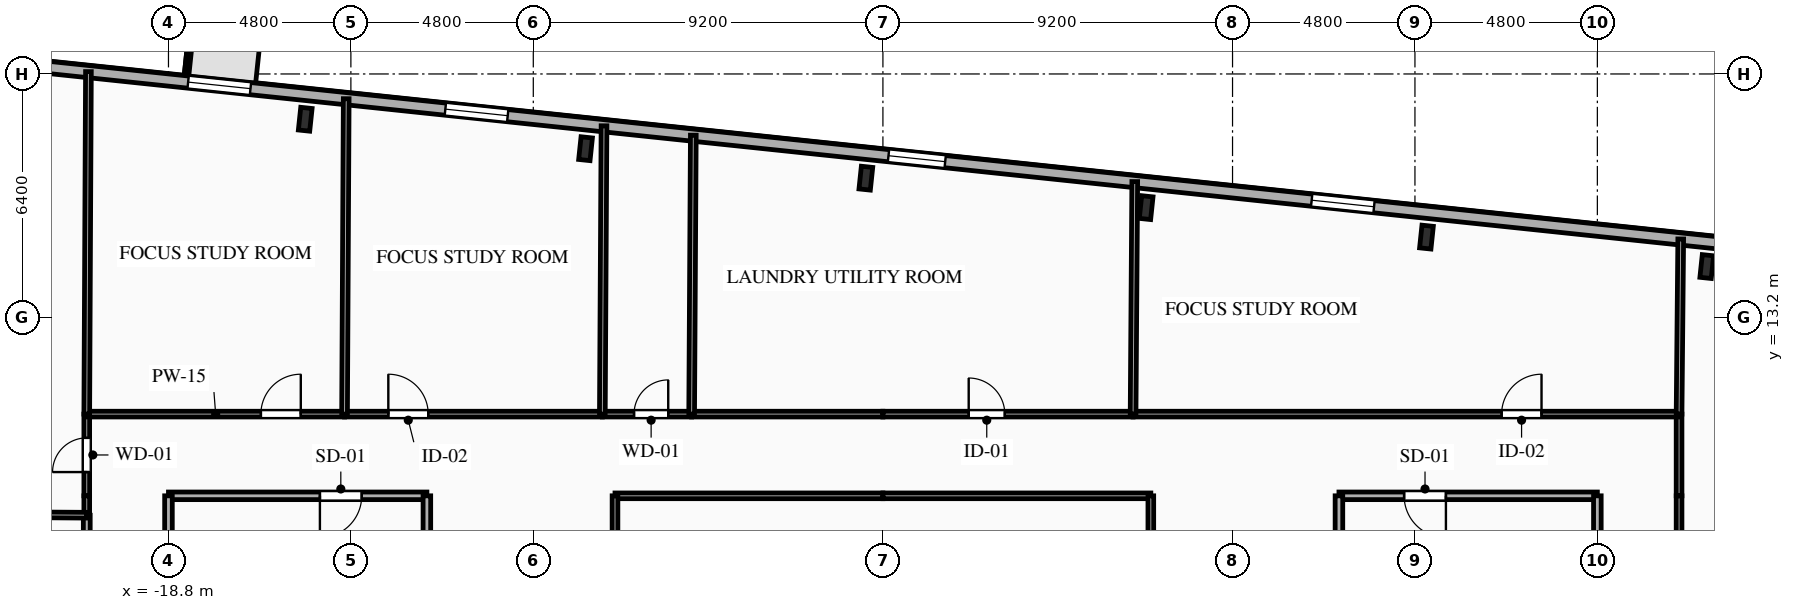
"""IFC4 building model, lengths in metres.
Left out: names, types, materials, properties, quantities, classifications, styles, units other than length and angle.
Written with IfcOpenShell. Run it as: python <this file> out.ifc"""

import sys

from ifc_helpers import new_model, si_unit, direction, frame, frame_2d, origin, origin_2d, place, context, subcontext, project, spatial, rectangle, i_section, extrude, element, fill, save


model = new_model("IFC4")
c1 = context("Model", 3, precision=1e-05, world=origin(), true_north=direction((0.0, 1.0)))
c2 = subcontext(c1, "Body", "Model", "MODEL_VIEW")
j1 = project(units=[si_unit("LENGTHUNIT", "METRE"), si_unit("PLANEANGLEUNIT", "RADIAN")], contexts=[c1])
p1 = place(None, origin())
s1 = spatial("IfcSite", under=j1, at=p1, CompositionType="ELEMENT")
p2 = place(p1, origin())
s2 = spatial("IfcBuilding", under=s1, at=p2, CompositionType="ELEMENT")
p3 = place(p2, frame((0.0, 0.0, 219.85)))
s3 = spatial("IfcBuildingStorey", under=s2, at=p3, CompositionType="ELEMENT", Elevation=219.85)
for number, where, z_axis, x_axis in (
    (1, (21.679, 14.532, 0.0), (0.0, 0.0, 1.0), (0.995, -0.105, 0.0)),
    (2, (14.303, 15.308, 0.0), (0.0, 0.0, 1.0), (0.995, -0.105, 0.0)),
    (3, (6.927, 16.083, 0.0), (0.0, 0.0, 1.0), (0.995, -0.105, 0.0)),
    (4, (-0.449, 16.858, 0.0), (0.0, 0.0, 1.0), (0.995, -0.105, 0.0)),
    (5, (-7.825, 17.634, 0.0), (0.0, 0.0, 1.0), (0.995, -0.105, 0.0)),
    (6, (-15.201, 18.409, 0.0), (0.0, 0.0, 1.0), (0.995, -0.105, 0.0)),
):
    element("IfcColumn", number, at=place(p3, frame(where, z_axis=z_axis, x_axis=x_axis)), inside=s3, PredefinedType="COLUMN", context=c2, shape_type="SweptSolid", body=[
        extrude(i_section(OverallWidth=0.3, OverallDepth=0.6, WebThickness=0.015, FlangeThickness=0.03, FilletRadius=0.027, at=origin_2d()), origin(), (0.0, 0.0, 1.0), 3.35),
    ])
p4 = place(p3, frame((-23.156, 19.898, 0.0), z_axis=(0.0, 0.0, 1.0), x_axis=(0.994522001802, -0.104527450613, 0.0)))
e7 = element("IfcWall", 7, at=p4, inside=s3, PredefinedType="SOLIDWALL", context=c2, shape_type="SweptSolid", body=[
    extrude(rectangle(XDim=45.8, YDim=0.32, at=frame_2d((22.9, 0.0))), origin(), (0.0, 0.0, 1.0), 3.0),
])
p5 = place(p4, frame((4.9, 0.0, 0.85)))
e8 = element("IfcOpeningElement", 8, at=p5, cuts=e7, PredefinedType="OPENING", context=c2, shape_type="SweptSolid", body=[
    extrude(rectangle(XDim=1.65, YDim=1.85, at=frame_2d((0.825, 0.925))), frame((0.0, 0.17, 0.0), z_axis=(0.0, -1.0, 0.0), x_axis=(1.0, 0.0, 0.0)), (0.0, 0.0, 1.0), 0.34),
])
p6 = place(p4, frame((11.706, 0.0, 0.85)))
e9 = element("IfcOpeningElement", 9, at=p6, cuts=e7, PredefinedType="OPENING", context=c2, shape_type="SweptSolid", body=[
    extrude(rectangle(XDim=1.65, YDim=1.85, at=frame_2d((0.825, 0.925))), frame((0.0, 0.17, 0.0), z_axis=(0.0, -1.0, 0.0), x_axis=(1.0, 0.0, 0.0)), (0.0, 0.0, 1.0), 0.34),
])
p7 = place(p4, frame((23.431, 0.0, 0.85)))
e10 = element("IfcOpeningElement", 10, at=p7, cuts=e7, PredefinedType="OPENING", context=c2, shape_type="SweptSolid", body=[
    extrude(rectangle(XDim=1.5, YDim=1.85, at=frame_2d((0.75, 0.925))), frame((0.0, 0.17, 0.0), z_axis=(0.0, -1.0, 0.0), x_axis=(1.0, 0.0, 0.0)), (0.0, 0.0, 1.0), 0.34),
])
p8 = place(p4, frame((34.628, 0.0, 0.85)))
e11 = element("IfcOpeningElement", 11, at=p8, cuts=e7, PredefinedType="OPENING", context=c2, shape_type="SweptSolid", body=[
    extrude(rectangle(XDim=1.65, YDim=1.85, at=frame_2d((0.825, 0.925))), frame((0.0, 0.17, 0.0), z_axis=(0.0, -1.0, 0.0), x_axis=(1.0, 0.0, 0.0)), (0.0, 0.0, 1.0), 0.34),
])
p9 = place(p3, frame((-12.0, 8.5, 0.0), z_axis=(0.0, 0.0, 1.0), x_axis=(-1.0, 0.0, 0.0)))
e12 = element("IfcWall", 12, at=p9, inside=s3, PredefinedType="PARTITIONING", context=c2, shape_type="SweptSolid", body=[
    extrude(rectangle(XDim=6.8, YDim=0.2, at=frame_2d((3.4, 0.0))), origin(), (0.0, 0.0, 1.0), 3.0),
])
p10 = place(p9, frame((1.715, 0.0, 0.0)))
e13 = element("IfcOpeningElement", 13, at=p10, cuts=e12, PredefinedType="OPENING", context=c2, shape_type="SweptSolid", body=[
    extrude(rectangle(XDim=1.1, YDim=2.15, at=frame_2d((0.55, 1.075))), frame((0.0, 0.11, 0.0), z_axis=(0.0, -1.0, 0.0), x_axis=(1.0, 0.0, 0.0)), (0.0, 0.0, 1.0), 0.22),
])
p11 = place(p3, frame((-18.8, 8.5, 0.0), z_axis=(0.0, 0.0, 1.0), x_axis=(0.0, -1.0, 0.0)))
e14 = element("IfcWall", 14, at=p11, inside=s3, PredefinedType="PARTITIONING", context=c2, shape_type="SweptSolid", body=[
    extrude(rectangle(XDim=2.9, YDim=0.2, at=frame_2d((1.45, 0.0))), origin(), (0.0, 0.0, 1.0), 2.625),
])
p12 = place(p3, frame((-12.0, 5.6, 0.0), z_axis=(0.0, 0.0, 1.0), x_axis=(0.0, 1.0, 0.0)))
e15 = element("IfcWall", 15, at=p12, inside=s3, PredefinedType="PARTITIONING", context=c2, shape_type="SweptSolid", body=[
    extrude(rectangle(XDim=2.9, YDim=0.2, at=frame_2d((1.45, 0.0))), origin(), (0.0, 0.0, 1.0), 3.0),
])
p13 = place(p3, frame((18.8, 8.5, 0.0), z_axis=(0.0, 0.0, 1.0), x_axis=(-1.0, 0.0, 0.0)))
e16 = element("IfcWall", 16, at=p13, inside=s3, PredefinedType="PARTITIONING", context=c2, shape_type="SweptSolid", body=[
    extrude(rectangle(XDim=6.8, YDim=0.2, at=frame_2d((3.4, 0.0))), origin(), (0.0, 0.0, 1.0), 3.0),
])
p14 = place(p13, frame((3.985, 0.0, 0.0)))
e17 = element("IfcOpeningElement", 17, at=p14, cuts=e16, PredefinedType="OPENING", context=c2, shape_type="SweptSolid", body=[
    extrude(rectangle(XDim=1.1, YDim=2.15, at=frame_2d((0.55, 1.075))), frame((0.0, 0.11, 0.0), z_axis=(0.0, -1.0, 0.0), x_axis=(1.0, 0.0, 0.0)), (0.0, 0.0, 1.0), 0.22),
])
p15 = place(p3, frame((18.8, 5.6, 0.0), z_axis=(0.0, 0.0, 1.0), x_axis=(0.0, 1.0, 0.0)))
e18 = element("IfcWall", 18, at=p15, inside=s3, PredefinedType="PARTITIONING", context=c2, shape_type="SweptSolid", body=[
    extrude(rectangle(XDim=2.9, YDim=0.2, at=frame_2d((1.45, 0.0))), origin(), (0.0, 0.0, 1.0), 2.625),
])
p16 = place(p3, frame((12.0, 8.5, 0.0), z_axis=(0.0, 0.0, 1.0), x_axis=(0.0, -1.0, 0.0)))
e19 = element("IfcWall", 19, at=p16, inside=s3, PredefinedType="PARTITIONING", context=c2, shape_type="SweptSolid", body=[
    extrude(rectangle(XDim=2.9, YDim=0.2, at=frame_2d((1.45, 0.0))), origin(), (0.0, 0.0, 1.0), 3.0),
])
p17 = place(p3, frame((-20.95, 8.5, 0.0), z_axis=(0.0, 0.0, 1.0), x_axis=(0.0, 1.0, 0.0)))
e20 = element("IfcWall", 20, at=p17, inside=s3, PredefinedType="PARTITIONING", context=c2, shape_type="SweptSolid", body=[
    extrude(rectangle(XDim=2.15, YDim=0.15, at=frame_2d((1.075, 0.0))), origin(), (0.0, 0.0, 1.0), 3.0),
])
p18 = place(p17, frame((0.625, 0.0, 0.0)))
e21 = element("IfcOpeningElement", 21, at=p18, cuts=e20, PredefinedType="OPENING", context=c2, shape_type="SweptSolid", body=[
    extrude(rectangle(XDim=0.9, YDim=2.1, at=frame_2d((0.45, 1.05))), frame((0.0, 0.085, 0.0), z_axis=(0.0, -1.0, 0.0), x_axis=(1.0, 0.0, 0.0)), (0.0, 0.0, 1.0), 0.17),
])
p19 = place(p3, frame((-20.95, 10.65, 0.0), z_axis=(0.0, 0.0, 1.0), x_axis=(1.0, 0.0, 0.0)))
e22 = element("IfcWall", 22, at=p19, inside=s3, PredefinedType="PARTITIONING", context=c2, shape_type="SweptSolid", body=[
    extrude(rectangle(XDim=6.783, YDim=0.15, at=frame_2d((3.392, 0.0))), origin(), (0.0, 0.0, 1.0), 3.0),
])
p20 = place(p19, frame((4.582, 0.0, 0.0)))
e23 = element("IfcOpeningElement", 23, at=p20, cuts=e22, PredefinedType="OPENING", context=c2, shape_type="SweptSolid", body=[
    extrude(rectangle(XDim=1.05, YDim=2.15, at=frame_2d((0.525, 1.075))), frame((0.0, 0.085, 0.0), z_axis=(0.0, -1.0, 0.0), x_axis=(1.0, 0.0, 0.0)), (0.0, 0.0, 1.0), 0.17),
])
p21 = place(p3, frame((-14.167, 10.65, 0.0), z_axis=(0.0, 0.0, 1.0), x_axis=(1.0, 0.0, 0.0)))
e24 = element("IfcWall", 24, at=p21, inside=s3, PredefinedType="PARTITIONING", context=c2, shape_type="SweptSolid", body=[
    extrude(rectangle(XDim=6.783, YDim=0.15, at=frame_2d((3.392, 0.0))), origin(), (0.0, 0.0, 1.0), 3.0),
])
p22 = place(p21, frame((1.152, 0.0, 0.0)))
e25 = element("IfcOpeningElement", 25, at=p22, cuts=e24, PredefinedType="OPENING", context=c2, shape_type="SweptSolid", body=[
    extrude(rectangle(XDim=1.05, YDim=2.15, at=frame_2d((0.525, 1.075))), frame((0.0, 0.085, 0.0), z_axis=(0.0, -1.0, 0.0), x_axis=(1.0, 0.0, 0.0)), (0.0, 0.0, 1.0), 0.17),
])
p23 = place(p3, frame((-7.383, 10.65, 0.0), z_axis=(0.0, 0.0, 1.0), x_axis=(1.0, 0.0, 0.0)))
e26 = element("IfcWall", 26, at=p23, inside=s3, PredefinedType="PLUMBINGWALL", context=c2, shape_type="SweptSolid", body=[
    extrude(rectangle(XDim=2.35, YDim=0.15, at=frame_2d((1.175, 0.0))), origin(), (0.0, 0.0, 1.0), 3.0),
])
p24 = place(p23, frame((0.834, 0.0, 0.0)))
e27 = element("IfcOpeningElement", 27, at=p24, cuts=e26, PredefinedType="OPENING", context=c2, shape_type="SweptSolid", body=[
    extrude(rectangle(XDim=0.9, YDim=2.1, at=frame_2d((0.45, 1.05))), frame((0.0, 0.085, 0.0), z_axis=(0.0, -1.0, 0.0), x_axis=(1.0, 0.0, 0.0)), (0.0, 0.0, 1.0), 0.17),
])
p25 = place(p3, frame((-5.033, 10.65, 0.0), z_axis=(0.0, 0.0, 1.0), x_axis=(1.0, 0.0, 0.0)))
e28 = element("IfcWall", 28, at=p25, inside=s3, PredefinedType="PARTITIONING", context=c2, shape_type="SweptSolid", body=[
    extrude(rectangle(XDim=5.033, YDim=0.15, at=frame_2d((2.517, 0.0))), origin(), (0.0, 0.0, 1.0), 3.0),
])
p26 = place(p3, frame((0.0, 8.5, 0.0), z_axis=(0.0, 0.0, 1.0), x_axis=(-1.0, 0.0, 0.0)))
e29 = element("IfcWall", 29, at=p26, inside=s3, PredefinedType="PARTITIONING", context=c2, shape_type="SweptSolid", body=[
    extrude(rectangle(XDim=7.05, YDim=0.15, at=frame_2d((3.525, 0.0))), origin(), (0.0, 0.0, 1.0), 3.0),
])
p27 = place(p3, frame((20.95, 10.65, 0.0), z_axis=(0.0, 0.0, 1.0), x_axis=(0.0, -1.0, 0.0)))
e30 = element("IfcWall", 30, at=p27, inside=s3, PredefinedType="PARTITIONING", context=c2, shape_type="SweptSolid", body=[
    extrude(rectangle(XDim=2.15, YDim=0.15, at=frame_2d((1.075, 0.0))), origin(), (0.0, 0.0, 1.0), 3.0),
])
p28 = place(p3, frame((0.0, 10.65, 0.0), z_axis=(0.0, 0.0, 1.0), x_axis=(1.0, 0.0, 0.0)))
e31 = element("IfcWall", 31, at=p28, inside=s3, PredefinedType="PARTITIONING", context=c2, shape_type="SweptSolid", body=[
    extrude(rectangle(XDim=6.583, YDim=0.15, at=frame_2d((3.292, 0.0))), origin(), (0.0, 0.0, 1.0), 3.0),
])
p29 = place(p28, frame((2.257, 0.0, 0.0)))
e32 = element("IfcOpeningElement", 32, at=p29, cuts=e31, PredefinedType="OPENING", context=c2, shape_type="SweptSolid", body=[
    extrude(rectangle(XDim=0.95, YDim=2.1, at=frame_2d((0.475, 1.05))), frame((0.0, 0.085, 0.0), z_axis=(0.0, -1.0, 0.0), x_axis=(1.0, 0.0, 0.0)), (0.0, 0.0, 1.0), 0.17),
])
p30 = place(p3, frame((6.583, 10.65, 0.0), z_axis=(0.0, 0.0, 1.0), x_axis=(1.0, 0.0, 0.0)))
e33 = element("IfcWall", 33, at=p30, inside=s3, PredefinedType="PARTITIONING", context=c2, shape_type="SweptSolid", body=[
    extrude(rectangle(XDim=14.367, YDim=0.15, at=frame_2d((7.184, 0.0))), origin(), (0.0, 0.0, 1.0), 3.0),
])
p31 = place(p30, frame((9.698, 0.0, 0.0)))
e34 = element("IfcOpeningElement", 34, at=p31, cuts=e33, PredefinedType="OPENING", context=c2, shape_type="SweptSolid", body=[
    extrude(rectangle(XDim=1.05, YDim=2.15, at=frame_2d((0.525, 1.075))), frame((0.0, 0.085, 0.0), z_axis=(0.0, -1.0, 0.0), x_axis=(1.0, 0.0, 0.0)), (0.0, 0.0, 1.0), 0.17),
])
p32 = place(p3, frame((7.05, 8.5, 0.0), z_axis=(0.0, 0.0, 1.0), x_axis=(-1.0, 0.0, 0.0)))
e35 = element("IfcWall", 35, at=p32, inside=s3, PredefinedType="PARTITIONING", context=c2, shape_type="SweptSolid", body=[
    extrude(rectangle(XDim=7.05, YDim=0.15, at=frame_2d((3.525, 0.0))), origin(), (0.0, 0.0, 1.0), 3.0),
])
p33 = place(p3, frame((-20.95, -1.306, 0.0), z_axis=(0.0, 0.0, 1.0), x_axis=(0.0, 1.0, 0.0)))
e36 = element("IfcWall", 36, at=p33, inside=s3, PredefinedType="PARTITIONING", context=c2, shape_type="SweptSolid", body=[
    extrude(rectangle(XDim=9.296, YDim=0.18, at=frame_2d((4.648, 0.0))), origin(), (0.0, 0.0, 1.0), 3.0),
])
p34 = place(p33, frame((1.472, 0.0, 0.0)))
e37 = element("IfcOpeningElement", 37, at=p34, cuts=e36, PredefinedType="OPENING", context=c2, shape_type="SweptSolid", body=[
    extrude(rectangle(XDim=1.0, YDim=2.15, at=frame_2d((0.5, 1.075))), frame((0.0, 0.1, 0.0), z_axis=(0.0, -1.0, 0.0), x_axis=(1.0, 0.0, 0.0)), (0.0, 0.0, 1.0), 0.2),
])
p35 = place(p3, frame((-20.95, 7.99, 0.0), z_axis=(0.0, 0.0, 1.0), x_axis=(0.0, 1.0, 0.0)))
e38 = element("IfcWall", 38, at=p35, inside=s3, PredefinedType="PARTITIONING", context=c2, shape_type="SweptSolid", body=[
    extrude(rectangle(XDim=0.51, YDim=0.15, at=frame_2d((0.255, 0.0))), origin(), (0.0, 0.0, 1.0), 3.0),
])
p36 = place(p3, frame((20.95, 8.5, 0.0), z_axis=(0.0, 0.0, 1.0), x_axis=(0.0, -1.0, 0.0)))
e39 = element("IfcWall", 39, at=p36, inside=s3, PredefinedType="PARTITIONING", context=c2, shape_type="SweptSolid", body=[
    extrude(rectangle(XDim=9.263, YDim=0.15, at=frame_2d((4.632, 0.0))), origin(), (0.0, 0.0, 1.0), 2.655),
])
p37 = place(p36, frame((6.751, 0.0, 0.0)))
e40 = element("IfcOpeningElement", 40, at=p37, cuts=e39, PredefinedType="OPENING", context=c2, shape_type="SweptSolid", body=[
    extrude(rectangle(XDim=1.05, YDim=2.15, at=frame_2d((0.525, 1.075))), frame((0.0, 0.085, 0.0), z_axis=(0.0, -1.0, 0.0), x_axis=(1.0, 0.0, 0.0)), (0.0, 0.0, 1.0), 0.17),
])
for number, where, z_axis, x_axis in (
    (41, (-7.05, 8.5, 0.0), (0.0, 0.0, 1.0), (0.0, -1.0, 0.0)),
    (42, (7.05, -0.8, 0.0), (0.0, 0.0, 1.0), (0.0, 1.0, 0.0)),
):
    element("IfcWall", number, at=place(p3, frame(where, z_axis=z_axis, x_axis=x_axis)), inside=s3, PredefinedType="PARTITIONING", context=c2, shape_type="SweptSolid", body=[
        extrude(rectangle(XDim=9.3, YDim=0.15, at=frame_2d((4.65, 0.0))), origin(), (0.0, 0.0, 1.0), 3.0),
    ])
p38 = place(p3, frame((-27.419, 8.034, 0.0), z_axis=(0.0, 0.0, 1.0), x_axis=(0.999976928608, -0.006792808784, 0.0)))
e43 = element("IfcWall", 43, at=p38, inside=s3, PredefinedType="PARTITIONING", context=c2, shape_type="SweptSolid", body=[
    extrude(rectangle(XDim=6.469, YDim=0.15, at=frame_2d((3.235, 0.0))), origin(), (0.0, 0.0, 1.0), 3.0),
])
p39 = place(p3, frame((-20.906, 19.662, 0.0), z_axis=(0.0, 0.0, 1.0), x_axis=(-0.004876272857, -0.999988110911, 0.0)))
e44 = element("IfcWall", 44, at=p39, inside=s3, PredefinedType="PARTITIONING", context=c2, shape_type="SweptSolid", body=[
    extrude(rectangle(XDim=9.012, YDim=0.15, at=frame_2d((4.506, 0.0))), origin(), (0.0, 0.0, 1.0), 2.625),
])
p40 = place(p3, frame((20.95, 10.65, 0.0), z_axis=(0.0, 0.0, 1.0), x_axis=(0.009535990233, 0.999954531411, 0.0)))
e45 = element("IfcWall", 45, at=p40, inside=s3, PredefinedType="PARTITIONING", context=c2, shape_type="SweptSolid", body=[
    extrude(rectangle(XDim=4.608, YDim=0.15, at=frame_2d((2.304, 0.0))), origin(), (0.0, 0.0, 1.0), 2.625),
])
p41 = place(p3, frame((-14.123, 18.949, 0.0), z_axis=(0.0, 0.0, 1.0), x_axis=(-0.005295133602, -0.999985980682, 0.0)))
e46 = element("IfcWall", 46, at=p41, inside=s3, PredefinedType="PARTITIONING", context=c2, shape_type="SweptSolid", body=[
    extrude(rectangle(XDim=8.299, YDim=0.15, at=frame_2d((4.149, 0.0))), origin(), (0.0, 0.0, 1.0), 3.0),
])
p42 = place(p3, frame((-7.339, 18.236, 0.0), z_axis=(0.0, 0.0, 1.0), x_axis=(-0.005792713287, -0.999983222096, 0.0)))
e47 = element("IfcWall", 47, at=p42, inside=s3, PredefinedType="PLUMBINGWALL", context=c2, shape_type="SweptSolid", body=[
    extrude(rectangle(XDim=7.586, YDim=0.15, at=frame_2d((3.793, 0.0))), origin(), (0.0, 0.0, 1.0), 3.0),
])
p43 = place(p3, frame((-4.989, 17.989, 0.0), z_axis=(0.0, 0.0, 1.0), x_axis=(-0.005987717415, -0.999982073459, 0.0)))
e48 = element("IfcWall", 48, at=p43, inside=s3, PredefinedType="PLUMBINGWALL", context=c2, shape_type="SweptSolid", body=[
    extrude(rectangle(XDim=7.339, YDim=0.15, at=frame_2d((3.67, 0.0))), origin(), (0.0, 0.0, 1.0), 3.0),
])
p44 = place(p3, frame((6.627, 16.768, 0.0), z_axis=(0.0, 0.0, 1.0), x_axis=(-0.007182576093, -0.999974204968, 0.0)))
e49 = element("IfcWall", 49, at=p44, inside=s3, PredefinedType="PARTITIONING", context=c2, shape_type="SweptSolid", body=[
    extrude(rectangle(XDim=6.118, YDim=0.15, at=frame_2d((3.059, 0.0))), origin(), (0.0, 0.0, 1.0), 3.0),
])
p45 = place(p5, origin())
e50 = element("IfcWindow", 50, at=p45, inside=s3, PartitioningType="SINGLE_PANEL", PredefinedType="WINDOW", context=c2, shape_type="SweptSolid", body=[
    extrude(rectangle(XDim=1.65, YDim=1.85, at=frame_2d((0.825, 0.925))), frame((0.0, 0.03, 0.0), z_axis=(0.0, -1.0, 0.0), x_axis=(1.0, 0.0, 0.0)), (0.0, 0.0, 1.0), 0.06),
])
fill(e8, e50)
p46 = place(p6, origin())
e51 = element("IfcWindow", 51, at=p46, inside=s3, PartitioningType="SINGLE_PANEL", PredefinedType="WINDOW", context=c2, shape_type="SweptSolid", body=[
    extrude(rectangle(XDim=1.65, YDim=1.85, at=frame_2d((0.825, 0.925))), frame((0.0, 0.03, 0.0), z_axis=(0.0, -1.0, 0.0), x_axis=(1.0, 0.0, 0.0)), (0.0, 0.0, 1.0), 0.06),
])
fill(e9, e51)
p47 = place(p7, origin())
e52 = element("IfcWindow", 52, at=p47, inside=s3, PartitioningType="SINGLE_PANEL", PredefinedType="WINDOW", context=c2, shape_type="SweptSolid", body=[
    extrude(rectangle(XDim=1.5, YDim=1.85, at=frame_2d((0.75, 0.925))), frame((0.0, 0.03, 0.0), z_axis=(0.0, -1.0, 0.0), x_axis=(1.0, 0.0, 0.0)), (0.0, 0.0, 1.0), 0.06),
])
fill(e10, e52)
p48 = place(p8, origin())
e53 = element("IfcWindow", 53, at=p48, inside=s3, PartitioningType="SINGLE_PANEL", PredefinedType="WINDOW", context=c2, shape_type="SweptSolid", body=[
    extrude(rectangle(XDim=1.65, YDim=1.85, at=frame_2d((0.825, 0.925))), frame((0.0, 0.03, 0.0), z_axis=(0.0, -1.0, 0.0), x_axis=(1.0, 0.0, 0.0)), (0.0, 0.0, 1.0), 0.06),
])
fill(e11, e53)
p49 = place(p10, origin())
e54 = element("IfcDoor", 54, at=p49, inside=s3, OperationType="SINGLE_SWING_RIGHT", PredefinedType="DOOR", context=c2, shape_type="SweptSolid", body=[
    extrude(rectangle(XDim=1.1, YDim=2.15, at=frame_2d((0.55, 1.075))), frame((0.0, 0.025, 0.0), z_axis=(0.0, -1.0, 0.0), x_axis=(1.0, 0.0, 0.0)), (0.0, 0.0, 1.0), 0.05),
])
fill(e13, e54)
p50 = place(p14, origin())
e55 = element("IfcDoor", 55, at=p50, inside=s3, OperationType="SINGLE_SWING_LEFT", PredefinedType="DOOR", context=c2, shape_type="SweptSolid", body=[
    extrude(rectangle(XDim=1.1, YDim=2.15, at=frame_2d((0.55, 1.075))), frame((0.0, 0.025, 0.0), z_axis=(0.0, -1.0, 0.0), x_axis=(1.0, 0.0, 0.0)), (0.0, 0.0, 1.0), 0.05),
])
fill(e17, e55)
p51 = place(p18, origin())
e56 = element("IfcDoor", 56, at=p51, inside=s3, OperationType="SINGLE_SWING_LEFT", PredefinedType="DOOR", context=c2, shape_type="SweptSolid", body=[
    extrude(rectangle(XDim=0.9, YDim=2.1, at=frame_2d((0.45, 1.05))), frame((0.0, 0.025, 0.0), z_axis=(0.0, -1.0, 0.0), x_axis=(1.0, 0.0, 0.0)), (0.0, 0.0, 1.0), 0.05),
])
fill(e21, e56)
p52 = place(p20, origin())
e57 = element("IfcDoor", 57, at=p52, inside=s3, OperationType="SINGLE_SWING_RIGHT", PredefinedType="DOOR", context=c2, shape_type="SweptSolid", body=[
    extrude(rectangle(XDim=1.05, YDim=2.15, at=frame_2d((0.525, 1.075))), frame((0.0, 0.025, 0.0), z_axis=(0.0, -1.0, 0.0), x_axis=(1.0, 0.0, 0.0)), (0.0, 0.0, 1.0), 0.05),
])
fill(e23, e57)
p53 = place(p22, origin())
e58 = element("IfcDoor", 58, at=p53, inside=s3, OperationType="SINGLE_SWING_LEFT", PredefinedType="DOOR", context=c2, shape_type="SweptSolid", body=[
    extrude(rectangle(XDim=1.05, YDim=2.15, at=frame_2d((0.525, 1.075))), frame((0.0, 0.025, 0.0), z_axis=(0.0, -1.0, 0.0), x_axis=(1.0, 0.0, 0.0)), (0.0, 0.0, 1.0), 0.05),
])
fill(e25, e58)
p54 = place(p24, origin())
e59 = element("IfcDoor", 59, at=p54, inside=s3, OperationType="SINGLE_SWING_RIGHT", PredefinedType="DOOR", context=c2, shape_type="SweptSolid", body=[
    extrude(rectangle(XDim=0.9, YDim=2.1, at=frame_2d((0.45, 1.05))), frame((0.0, 0.025, 0.0), z_axis=(0.0, -1.0, 0.0), x_axis=(1.0, 0.0, 0.0)), (0.0, 0.0, 1.0), 0.05),
])
fill(e27, e59)
p55 = place(p29, origin())
e60 = element("IfcDoor", 60, at=p55, inside=s3, OperationType="SINGLE_SWING_LEFT", PredefinedType="DOOR", context=c2, shape_type="SweptSolid", body=[
    extrude(rectangle(XDim=0.95, YDim=2.1, at=frame_2d((0.475, 1.05))), frame((0.0, 0.025, 0.0), z_axis=(0.0, -1.0, 0.0), x_axis=(1.0, 0.0, 0.0)), (0.0, 0.0, 1.0), 0.05),
])
fill(e32, e60)
p56 = place(p31, origin())
e61 = element("IfcDoor", 61, at=p56, inside=s3, OperationType="SINGLE_SWING_RIGHT", PredefinedType="DOOR", context=c2, shape_type="SweptSolid", body=[
    extrude(rectangle(XDim=1.05, YDim=2.15, at=frame_2d((0.525, 1.075))), frame((0.0, 0.025, 0.0), z_axis=(0.0, -1.0, 0.0), x_axis=(1.0, 0.0, 0.0)), (0.0, 0.0, 1.0), 0.05),
])
fill(e34, e61)
save(model, sys.argv[1])
